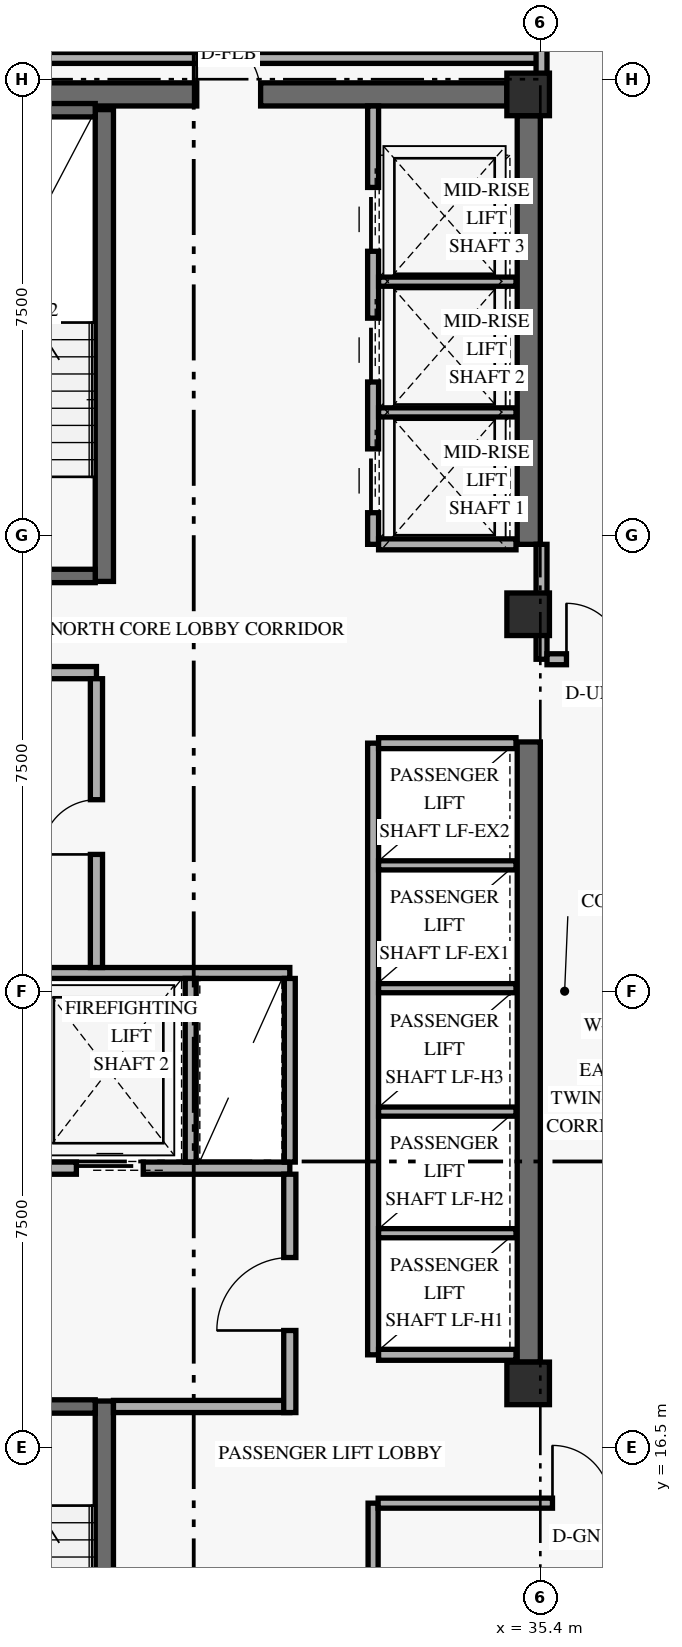
"""IFC4 building model, lengths in metres.
Left out: names, types, materials, properties, quantities, classifications, styles, units other than length and angle.
Written with IfcOpenShell. Run it as: python <this file> out.ifc"""

import sys

from ifc_helpers import new_model, si_unit, direction, frame, frame_2d, origin, origin_2d, place, context, subcontext, project, spatial, rectangle, extrude, element, fill, save


model = new_model("IFC4")
c1 = context("Model", 3, precision=1e-05, world=origin(), true_north=direction((0.0, 1.0)))
c2 = subcontext(c1, "Body", "Model", "MODEL_VIEW")
j1 = project(units=[si_unit("LENGTHUNIT", "METRE"), si_unit("PLANEANGLEUNIT", "RADIAN")], contexts=[c1])
p1 = place(None, origin())
s1 = spatial("IfcSite", under=j1, at=p1, CompositionType="ELEMENT")
p2 = place(p1, origin())
s2 = spatial("IfcBuilding", under=s1, at=p2, CompositionType="ELEMENT")
p3 = place(p2, frame((0.0, 0.0, 177.6)))
s3 = spatial("IfcBuildingStorey", under=s2, at=p3, CompositionType="ELEMENT", Elevation=177.6)
p4 = place(p3, frame((35.21, 17.9, 0.0), z_axis=(0.0, 0.0, 1.0), x_axis=(0.0, 1.0, 0.0)))
e1 = element("IfcWall", 1, at=p4, inside=s3, PredefinedType="SHEAR", context=c2, shape_type="SweptSolid", body=[
    extrude(rectangle(XDim=10.2, YDim=0.38, at=frame_2d((5.1, 0.0))), origin(), (0.0, 0.0, 1.0), 2.748),
])
p5 = place(p3, frame((35.21, 31.35, 0.0), z_axis=(0.0, 0.0, 1.0), x_axis=(0.0, 1.0, 0.0)))
e2 = element("IfcWall", 2, at=p5, inside=s3, PredefinedType="SHEAR", context=c2, shape_type="SweptSolid", body=[
    extrude(rectangle(XDim=7.05, YDim=0.38, at=frame_2d((3.525, 0.0))), origin(), (0.0, 0.0, 1.0), 2.748),
])
p6 = place(p3, frame((24.55, 38.75, 0.0), z_axis=(0.0, 0.0, 1.0), x_axis=(1.0, 0.0, 0.0)))
e3 = element("IfcWall", 3, at=p6, inside=s3, PredefinedType="SHEAR", context=c2, shape_type="SweptSolid", body=[
    extrude(rectangle(XDim=10.3, YDim=0.38, at=frame_2d((5.15, 0.0))), origin(), (0.0, 0.0, 1.0), 3.36),
])
p7 = place(p6, frame((5.2, 0.0, 0.0)))
e4 = element("IfcOpeningElement", 4, at=p7, cuts=e3, PredefinedType="OPENING", context=c2, shape_type="SweptSolid", body=[
    extrude(rectangle(XDim=1.05, YDim=2.15, at=frame_2d((0.525, 1.075))), frame((0.0, 0.2, 0.0), z_axis=(0.0, -1.0, 0.0), x_axis=(1.0, 0.0, 0.0)), (0.0, 0.0, 1.0), 0.4),
])
p8 = place(p3, frame((28.23, 9.5, 0.0), z_axis=(0.0, 0.0, 1.0), x_axis=(0.0, 1.0, 0.0)))
e5 = element("IfcWall", 5, at=p8, inside=s3, PredefinedType="SHEAR", context=c2, shape_type="SweptSolid", body=[
    extrude(rectangle(XDim=7.76, YDim=0.3, at=frame_2d((3.88, 0.0))), origin(), (0.0, 0.0, 1.0), 3.36),
])
p9 = place(p3, frame((24.92, 17.17, 0.0), z_axis=(0.0, 0.0, 1.0), x_axis=(1.0, 0.0, 0.0)))
e6 = element("IfcWall", 6, at=p9, inside=s3, PredefinedType="SHEAR", context=c2, shape_type="SweptSolid", body=[
    extrude(rectangle(XDim=3.16, YDim=0.22, at=frame_2d((1.58, 0.0))), origin(), (0.0, 0.0, 1.0), 3.36),
])
p10 = place(p9, frame((0.78, 0.0, 0.0)))
e7 = element("IfcOpeningElement", 7, at=p10, cuts=e6, PredefinedType="OPENING", context=c2, shape_type="SweptSolid", body=[
    extrude(rectangle(XDim=1.05, YDim=2.15, at=frame_2d((0.525, 1.075))), frame((0.0, 0.12, 0.0), z_axis=(0.0, -1.0, 0.0), x_axis=(1.0, 0.0, 0.0)), (0.0, 0.0, 1.0), 0.24),
])
p11 = place(p3, frame((28.23, 30.74, 0.0), z_axis=(0.0, 0.0, 1.0), x_axis=(0.0, 1.0, 0.0)))
e8 = element("IfcWall", 8, at=p11, inside=s3, PredefinedType="SHEAR", context=c2, shape_type="SweptSolid", body=[
    extrude(rectangle(XDim=7.76, YDim=0.3, at=frame_2d((3.88, 0.0))), origin(), (0.0, 0.0, 1.0), 3.36),
])
p12 = place(p3, frame((24.92, 30.83, 0.0), z_axis=(0.0, 0.0, 1.0), x_axis=(1.0, 0.0, 0.0)))
e9 = element("IfcWall", 9, at=p12, inside=s3, PredefinedType="SHEAR", context=c2, shape_type="SweptSolid", body=[
    extrude(rectangle(XDim=3.16, YDim=0.22, at=frame_2d((1.58, 0.0))), origin(), (0.0, 0.0, 1.0), 3.36),
])
p13 = place(p12, frame((0.78, 0.0, 0.0)))
e10 = element("IfcOpeningElement", 10, at=p13, cuts=e9, PredefinedType="OPENING", context=c2, shape_type="SweptSolid", body=[
    extrude(rectangle(XDim=1.05, YDim=2.15, at=frame_2d((0.525, 1.075))), frame((0.0, 0.12, 0.0), z_axis=(0.0, -1.0, 0.0), x_axis=(1.0, 0.0, 0.0)), (0.0, 0.0, 1.0), 0.24),
])
p14 = place(p3, frame((24.92, 38.49, 0.0), z_axis=(0.0, 0.0, 1.0), x_axis=(1.0, 0.0, 0.0)))
e11 = element("IfcWall", 11, at=p14, inside=s3, PredefinedType="SHEAR", context=c2, shape_type="SweptSolid", body=[
    extrude(rectangle(XDim=3.16, YDim=0.22, at=frame_2d((1.58, 0.0))), origin(), (0.0, 0.0, 1.0), 3.36),
])
for number, where, z_axis, x_axis in (
    (12, (35.2, 17.55, 0.0), (0.0, 0.0, 1.0), (1.0, 0.0, 0.0)),
    (13, (35.2, 30.2, 0.0), (0.0, 0.0, 1.0), (1.0, 0.0, 0.0)),
    (14, (35.2, 38.75, 0.0), (0.0, 0.0, 1.0), (1.0, 0.0, 0.0)),
):
    element("IfcColumn", number, at=place(p3, frame(where, z_axis=z_axis, x_axis=x_axis)), inside=s3, PredefinedType="COLUMN", context=c2, shape_type="SweptSolid", body=[
        extrude(rectangle(XDim=0.7, YDim=0.7, at=origin_2d()), origin(), (0.0, 0.0, 1.0), 3.6),
    ])
p15 = place(p3, frame((24.45, 21.09, 0.0), z_axis=(0.0, 0.0, 1.0), x_axis=(1.0, 0.0, 0.0)))
e15 = element("IfcWall", 15, at=p15, inside=s3, PredefinedType="STANDARD", context=c2, shape_type="SweptSolid", body=[
    extrude(rectangle(XDim=6.83, YDim=0.2, at=frame_2d((3.415, 0.0))), origin(), (0.0, 0.0, 1.0), 3.36),
])
p16 = place(p15, frame((0.72, 0.0, 0.0)))
e16 = element("IfcOpeningElement", 16, at=p16, cuts=e15, PredefinedType="OPENING", context=c2, shape_type="SweptSolid", body=[
    extrude(rectangle(XDim=1.1, YDim=2.2, at=frame_2d((0.55, 1.1))), frame((0.0, 0.11, 0.0), z_axis=(0.0, -1.0, 0.0), x_axis=(1.0, 0.0, 0.0)), (0.0, 0.0, 1.0), 0.22),
])
p17 = place(p15, frame((3.32, 0.0, 0.0)))
e17 = element("IfcOpeningElement", 17, at=p17, cuts=e15, PredefinedType="OPENING", context=c2, shape_type="SweptSolid", body=[
    extrude(rectangle(XDim=1.1, YDim=2.2, at=frame_2d((0.55, 1.1))), frame((0.0, 0.11, 0.0), z_axis=(0.0, -1.0, 0.0), x_axis=(1.0, 0.0, 0.0)), (0.0, 0.0, 1.0), 0.22),
])
p18 = place(p3, frame((28.38, 17.17, 0.0), z_axis=(0.0, 0.0, 1.0), x_axis=(1.0, 0.0, 0.0)))
e18 = element("IfcWall", 18, at=p18, inside=s3, PredefinedType="STANDARD", context=c2, shape_type="SweptSolid", body=[
    extrude(rectangle(XDim=2.9, YDim=0.2, at=frame_2d((1.45, 0.0))), origin(), (0.0, 0.0, 1.0), 3.36),
])
p19 = place(p3, frame((31.28, 17.07, 0.0), z_axis=(0.0, 0.0, 1.0), x_axis=(0.0, 1.0, 0.0)))
e19 = element("IfcWall", 19, at=p19, inside=s3, PredefinedType="STANDARD", context=c2, shape_type="SweptSolid", body=[
    extrude(rectangle(XDim=3.92, YDim=0.2, at=frame_2d((1.96, 0.0))), origin(), (0.0, 0.0, 1.0), 2.73),
])
p20 = place(p19, frame((1.35, 0.0, 0.0)))
e20 = element("IfcOpeningElement", 20, at=p20, cuts=e19, PredefinedType="OPENING", context=c2, shape_type="SweptSolid", body=[
    extrude(rectangle(XDim=1.2, YDim=2.15, at=frame_2d((0.6, 1.075))), frame((0.0, 0.11, 0.0), z_axis=(0.0, -1.0, 0.0), x_axis=(1.0, 0.0, 0.0)), (0.0, 0.0, 1.0), 0.22),
])
p21 = place(p3, frame((24.45, 24.3, 0.0), z_axis=(0.0, 0.0, 1.0), x_axis=(1.0, 0.0, 0.0)))
e21 = element("IfcWall", 21, at=p21, inside=s3, PredefinedType="STANDARD", context=c2, shape_type="SweptSolid", body=[
    extrude(rectangle(XDim=6.83, YDim=0.18, at=frame_2d((3.415, 0.0))), origin(), (0.0, 0.0, 1.0), 3.36),
])
for number, where, z_axis, x_axis in (
    (22, (29.65, 21.19, 0.0), (0.0, 0.0, 1.0), (0.0, 1.0, 0.0)),
    (23, (31.28, 21.19, 0.0), (0.0, 0.0, 1.0), (0.0, 1.0, 0.0)),
):
    element("IfcWall", number, at=place(p3, frame(where, z_axis=z_axis, x_axis=x_axis)), inside=s3, PredefinedType="STANDARD", context=c2, shape_type="SweptSolid", body=[
        extrude(rectangle(XDim=3.02, YDim=0.18, at=frame_2d((1.51, 0.0))), origin(), (0.0, 0.0, 1.0), 3.36),
    ])
p22 = place(p3, frame((24.45, 29.24, 0.0), z_axis=(0.0, 0.0, 1.0), x_axis=(1.0, 0.0, 0.0)))
e24 = element("IfcWall", 24, at=p22, inside=s3, PredefinedType="STANDARD", context=c2, shape_type="SweptSolid", body=[
    extrude(rectangle(XDim=3.65, YDim=0.2, at=frame_2d((1.825, 0.0))), origin(), (0.0, 0.0, 1.0), 3.36),
])
p23 = place(p3, frame((28.1, 24.39, 0.0), z_axis=(0.0, 0.0, 1.0), x_axis=(0.0, 1.0, 0.0)))
e25 = element("IfcWall", 25, at=p23, inside=s3, PredefinedType="STANDARD", context=c2, shape_type="SweptSolid", body=[
    extrude(rectangle(XDim=4.75, YDim=0.2, at=frame_2d((2.375, 0.0))), origin(), (0.0, 0.0, 1.0), 3.36),
])
p24 = place(p23, frame((1.86, 0.0, 0.0)))
e26 = element("IfcOpeningElement", 26, at=p24, cuts=e25, PredefinedType="OPENING", context=c2, shape_type="SweptSolid", body=[
    extrude(rectangle(XDim=0.9, YDim=2.1, at=frame_2d((0.45, 1.05))), frame((0.0, 0.11, 0.0), z_axis=(0.0, -1.0, 0.0), x_axis=(1.0, 0.0, 0.0)), (0.0, 0.0, 1.0), 0.22),
])
p25 = place(p3, frame((32.65, 18.02, 0.0), z_axis=(0.0, 0.0, 1.0), x_axis=(0.0, 1.0, 0.0)))
e27 = element("IfcWall", 27, at=p25, inside=s3, PredefinedType="STANDARD", context=c2, shape_type="SweptSolid", body=[
    extrude(rectangle(XDim=10.06, YDim=0.18, at=frame_2d((5.03, 0.0))), origin(), (0.0, 0.0, 1.0), 3.36),
])
for number, where, z_axis, x_axis in (
    (28, (32.74, 18.02, 0.0), (0.0, 0.0, 1.0), (1.0, 0.0, 0.0)),
    (29, (32.74, 28.08, 0.0), (0.0, 0.0, 1.0), (1.0, 0.0, 0.0)),
):
    element("IfcWall", number, at=place(p3, frame(where, z_axis=z_axis, x_axis=x_axis)), inside=s3, PredefinedType="STANDARD", context=c2, shape_type="SweptSolid", body=[
        extrude(rectangle(XDim=2.26, YDim=0.18, at=frame_2d((1.13, 0.0))), origin(), (0.0, 0.0, 1.0), 3.36),
    ])
for number, where, z_axis, x_axis in (
    (30, (32.74, 20.02, 0.0), (0.0, 0.0, 1.0), (1.0, 0.0, 0.0)),
    (31, (32.74, 22.02, 0.0), (0.0, 0.0, 1.0), (1.0, 0.0, 0.0)),
    (32, (32.74, 24.05, 0.0), (0.0, 0.0, 1.0), (1.0, 0.0, 0.0)),
    (33, (32.74, 26.07, 0.0), (0.0, 0.0, 1.0), (1.0, 0.0, 0.0)),
):
    element("IfcWall", number, at=place(p3, frame(where, z_axis=z_axis, x_axis=x_axis)), inside=s3, PredefinedType="STANDARD", context=c2, shape_type="SweptSolid", body=[
        extrude(rectangle(XDim=2.26, YDim=0.15, at=frame_2d((1.13, 0.0))), origin(), (0.0, 0.0, 1.0), 3.36),
    ])
p26 = place(p3, frame((32.65, 31.35, 0.0), z_axis=(0.0, 0.0, 1.0), x_axis=(0.0, 1.0, 0.0)))
e34 = element("IfcWall", 34, at=p26, inside=s3, PredefinedType="STANDARD", context=c2, shape_type="SweptSolid", body=[
    extrude(rectangle(XDim=7.21, YDim=0.18, at=frame_2d((3.605, 0.0))), origin(), (0.0, 0.0, 1.0), 3.36),
])
p27 = place(p26, frame((0.52, 0.0, 0.0)))
e35 = element("IfcOpeningElement", 35, at=p27, cuts=e34, PredefinedType="OPENING", context=c2, shape_type="SweptSolid", body=[
    extrude(rectangle(XDim=1.05, YDim=2.2, at=frame_2d((0.525, 1.1))), frame((0.0, 0.1, 0.0), z_axis=(0.0, -1.0, 0.0), x_axis=(1.0, 0.0, 0.0)), (0.0, 0.0, 1.0), 0.2),
])
p28 = place(p26, frame((2.67, 0.0, 0.0)))
e36 = element("IfcOpeningElement", 36, at=p28, cuts=e34, PredefinedType="OPENING", context=c2, shape_type="SweptSolid", body=[
    extrude(rectangle(XDim=1.05, YDim=2.2, at=frame_2d((0.525, 1.1))), frame((0.0, 0.1, 0.0), z_axis=(0.0, -1.0, 0.0), x_axis=(1.0, 0.0, 0.0)), (0.0, 0.0, 1.0), 0.2),
])
p29 = place(p26, frame((4.82, 0.0, 0.0)))
e37 = element("IfcOpeningElement", 37, at=p29, cuts=e34, PredefinedType="OPENING", context=c2, shape_type="SweptSolid", body=[
    extrude(rectangle(XDim=1.05, YDim=2.2, at=frame_2d((0.525, 1.1))), frame((0.0, 0.1, 0.0), z_axis=(0.0, -1.0, 0.0), x_axis=(1.0, 0.0, 0.0)), (0.0, 0.0, 1.0), 0.2),
])
p30 = place(p3, frame((32.74, 31.35, 0.0), z_axis=(0.0, 0.0, 1.0), x_axis=(1.0, 0.0, 0.0)))
e38 = element("IfcWall", 38, at=p30, inside=s3, PredefinedType="STANDARD", context=c2, shape_type="SweptSolid", body=[
    extrude(rectangle(XDim=2.26, YDim=0.18, at=frame_2d((1.13, 0.0))), origin(), (0.0, 0.0, 1.0), 3.36),
])
for number, where, z_axis, x_axis in (
    (39, (32.74, 33.52, 0.0), (0.0, 0.0, 1.0), (1.0, 0.0, 0.0)),
    (40, (32.74, 35.67, 0.0), (0.0, 0.0, 1.0), (1.0, 0.0, 0.0)),
):
    element("IfcWall", number, at=place(p3, frame(where, z_axis=z_axis, x_axis=x_axis)), inside=s3, PredefinedType="STANDARD", context=c2, shape_type="SweptSolid", body=[
        extrude(rectangle(XDim=2.26, YDim=0.15, at=frame_2d((1.13, 0.0))), origin(), (0.0, 0.0, 1.0), 3.36),
    ])
p31 = place(p3, frame((32.65, 9.5, 0.0), z_axis=(0.0, 0.0, 1.0), x_axis=(0.0, 1.0, 0.0)))
e41 = element("IfcWall", 41, at=p31, inside=s3, PredefinedType="PARTITIONING", context=c2, shape_type="SweptSolid", body=[
    extrude(rectangle(XDim=6.08, YDim=0.165, at=frame_2d((3.04, 0.0))), origin(), (0.0, 0.0, 1.0), 3.36),
])
p32 = place(p3, frame((32.732, 15.58, 0.0), z_axis=(0.0, 0.0, 1.0), x_axis=(1.0, 0.0, 0.0)))
e42 = element("IfcWall", 42, at=p32, inside=s3, PredefinedType="PARTITIONING", context=c2, shape_type="SweptSolid", body=[
    extrude(rectangle(XDim=4.818, YDim=0.165, at=frame_2d((2.409, 0.0))), origin(), (0.0, 0.0, 1.0), 2.73),
])
p33 = place(p32, frame((2.867, 0.0, 0.0)))
e43 = element("IfcOpeningElement", 43, at=p33, cuts=e42, PredefinedType="OPENING", context=c2, shape_type="SweptSolid", body=[
    extrude(rectangle(XDim=0.95, YDim=2.15, at=frame_2d((0.475, 1.075))), frame((0.0, 0.093, 0.0), z_axis=(0.0, -1.0, 0.0), x_axis=(1.0, 0.0, 0.0)), (0.0, 0.0, 1.0), 0.185),
])
p34 = place(p3, frame((35.42, 29.46, 0.0), z_axis=(0.0, 0.0, 1.0), x_axis=(0.0, 1.0, 0.0)))
e44 = element("IfcWall", 44, at=p34, inside=s3, PredefinedType="STANDARD", context=c2, shape_type="SweptSolid", body=[
    extrude(rectangle(XDim=1.89, YDim=0.18, at=frame_2d((0.945, 0.0))), origin(), (0.0, 0.0, 1.0), 2.73),
])
p35 = place(p3, frame((35.51, 29.46, 0.0), z_axis=(0.0, 0.0, 1.0), x_axis=(1.0, 0.0, 0.0)))
e45 = element("IfcWall", 45, at=p35, inside=s3, PredefinedType="STANDARD", context=c2, shape_type="SweptSolid", body=[
    extrude(rectangle(XDim=12.29, YDim=0.18, at=frame_2d((6.145, 0.0))), origin(), (0.0, 0.0, 1.0), 2.73),
])
p36 = place(p35, frame((0.32, 0.0, 0.0)))
e46 = element("IfcOpeningElement", 46, at=p36, cuts=e45, PredefinedType="OPENING", context=c2, shape_type="SweptSolid", body=[
    extrude(rectangle(XDim=0.92, YDim=2.15, at=frame_2d((0.46, 1.075))), frame((0.0, 0.1, 0.0), z_axis=(0.0, -1.0, 0.0), x_axis=(1.0, 0.0, 0.0)), (0.0, 0.0, 1.0), 0.2),
])
p37 = place(p3, frame((23.85, 39.35, 0.0), z_axis=(0.0, 0.0, 1.0), x_axis=(1.0, 0.0, 0.0)))
e47 = element("IfcWall", 47, at=p37, inside=s3, PredefinedType="STANDARD", context=c2, shape_type="SweptSolid", body=[
    extrude(rectangle(XDim=11.57, YDim=0.18, at=frame_2d((5.785, 0.0))), origin(), (0.0, 0.0, 1.0), 2.73),
])
p38 = place(p3, frame((35.42, 38.75, 0.0), z_axis=(0.0, 0.0, 1.0), x_axis=(0.0, 1.0, 0.0)))
e48 = element("IfcWall", 48, at=p38, inside=s3, PredefinedType="PARTITIONING", context=c2, shape_type="SweptSolid", body=[
    extrude(rectangle(XDim=4.97, YDim=0.18, at=frame_2d((2.485, 0.0))), origin(), (0.0, 0.0, 1.0), 2.73),
])
p39 = place(p17, origin())
e49 = element("IfcDoor", 49, at=p39, inside=s3, OperationType="SLIDING_TO_LEFT", PredefinedType="DOOR", context=c2, shape_type="SweptSolid", body=[
    extrude(rectangle(XDim=1.1, YDim=2.2, at=frame_2d((0.55, 1.1))), frame((0.0, 0.025, 0.0), z_axis=(0.0, -1.0, 0.0), x_axis=(1.0, 0.0, 0.0)), (0.0, 0.0, 1.0), 0.05),
])
fill(e17, e49)
p40 = place(p20, origin())
e50 = element("IfcDoor", 50, at=p40, inside=s3, OperationType="SINGLE_SWING_LEFT", PredefinedType="DOOR", context=c2, shape_type="SweptSolid", body=[
    extrude(rectangle(XDim=1.2, YDim=2.15, at=frame_2d((0.6, 1.075))), frame((0.0, 0.025, 0.0), z_axis=(0.0, -1.0, 0.0), x_axis=(1.0, 0.0, 0.0)), (0.0, 0.0, 1.0), 0.05),
])
fill(e20, e50)
p41 = place(p24, origin())
e51 = element("IfcDoor", 51, at=p41, inside=s3, OperationType="SINGLE_SWING_LEFT", PredefinedType="DOOR", context=c2, shape_type="SweptSolid", body=[
    extrude(rectangle(XDim=0.9, YDim=2.1, at=frame_2d((0.45, 1.05))), frame((0.0, 0.025, 0.0), z_axis=(0.0, -1.0, 0.0), x_axis=(1.0, 0.0, 0.0)), (0.0, 0.0, 1.0), 0.05),
])
fill(e26, e51)
p42 = place(p27, origin())
e52 = element("IfcDoor", 52, at=p42, inside=s3, OperationType="SLIDING_TO_LEFT", PredefinedType="DOOR", context=c2, shape_type="SweptSolid", body=[
    extrude(rectangle(XDim=1.05, YDim=2.2, at=frame_2d((0.525, 1.1))), frame((0.0, 0.025, 0.0), z_axis=(0.0, -1.0, 0.0), x_axis=(1.0, 0.0, 0.0)), (0.0, 0.0, 1.0), 0.05),
])
fill(e35, e52)
p43 = place(p28, origin())
e53 = element("IfcDoor", 53, at=p43, inside=s3, OperationType="SLIDING_TO_LEFT", PredefinedType="DOOR", context=c2, shape_type="SweptSolid", body=[
    extrude(rectangle(XDim=1.05, YDim=2.2, at=frame_2d((0.525, 1.1))), frame((0.0, 0.025, 0.0), z_axis=(0.0, -1.0, 0.0), x_axis=(1.0, 0.0, 0.0)), (0.0, 0.0, 1.0), 0.05),
])
fill(e36, e53)
p44 = place(p29, origin())
e54 = element("IfcDoor", 54, at=p44, inside=s3, OperationType="SLIDING_TO_LEFT", PredefinedType="DOOR", context=c2, shape_type="SweptSolid", body=[
    extrude(rectangle(XDim=1.05, YDim=2.2, at=frame_2d((0.525, 1.1))), frame((0.0, 0.025, 0.0), z_axis=(0.0, -1.0, 0.0), x_axis=(1.0, 0.0, 0.0)), (0.0, 0.0, 1.0), 0.05),
])
fill(e37, e54)
p45 = place(p33, origin())
e55 = element("IfcDoor", 55, at=p45, inside=s3, OperationType="SINGLE_SWING_LEFT", PredefinedType="DOOR", context=c2, shape_type="SweptSolid", body=[
    extrude(rectangle(XDim=0.95, YDim=2.15, at=frame_2d((0.475, 1.075))), frame((0.0, 0.025, 0.0), z_axis=(0.0, -1.0, 0.0), x_axis=(1.0, 0.0, 0.0)), (0.0, 0.0, 1.0), 0.05),
])
fill(e43, e55)
p46 = place(p7, frame((1.05, 0.0, 0.0), z_axis=(0.0, 0.0, 1.0), x_axis=(-1.0, 0.0, 0.0)))
e56 = element("IfcDoor", 56, at=p46, inside=s3, OperationType="SINGLE_SWING_RIGHT", PredefinedType="DOOR", context=c2, shape_type="SweptSolid", body=[
    extrude(rectangle(XDim=1.05, YDim=2.15, at=frame_2d((0.525, 1.075))), frame((0.0, 0.025, 0.0), z_axis=(0.0, -1.0, 0.0), x_axis=(1.0, 0.0, 0.0)), (0.0, 0.0, 1.0), 0.05),
])
fill(e4, e56)
p47 = place(p36, origin())
e57 = element("IfcDoor", 57, at=p47, inside=s3, OperationType="SINGLE_SWING_LEFT", PredefinedType="DOOR", context=c2, shape_type="SweptSolid", body=[
    extrude(rectangle(XDim=0.92, YDim=2.15, at=frame_2d((0.46, 1.075))), frame((0.0, 0.025, 0.0), z_axis=(0.0, -1.0, 0.0), x_axis=(1.0, 0.0, 0.0)), (0.0, 0.0, 1.0), 0.05),
])
fill(e46, e57)
save(model, sys.argv[1])
